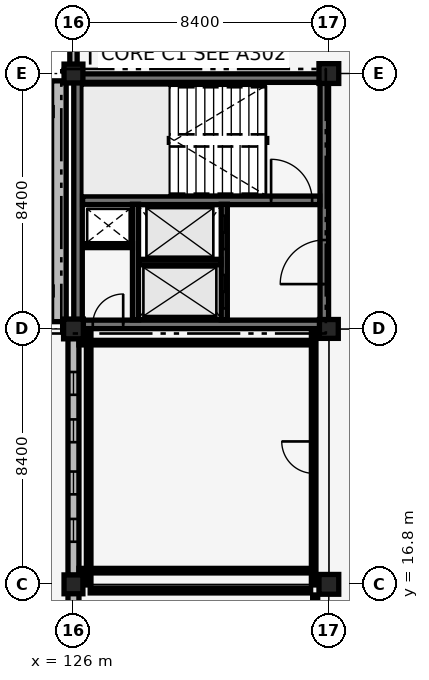
"""IFC4 building model, lengths in metres.
Left out: names, types, materials, properties, quantities, classifications, styles, units other than length and angle.
Written with IfcOpenShell. Run it as: python <this file> out.ifc"""

import sys

from ifc_helpers import new_model, si_unit, direction, frame, frame_2d, origin, origin_2d, place, context, subcontext, project, spatial, rectangle, extrude, element, fill, save


model = new_model("IFC4")
c1 = context("Model", 3, precision=1e-05, world=origin(), true_north=direction((0.0, 1.0)))
c2 = subcontext(c1, "Body", "Model", "MODEL_VIEW")
j1 = project(units=[si_unit("LENGTHUNIT", "METRE"), si_unit("PLANEANGLEUNIT", "RADIAN")], contexts=[c1])
p1 = place(None, origin())
s1 = spatial("IfcSite", under=j1, at=p1, CompositionType="ELEMENT")
p2 = place(p1, origin())
s2 = spatial("IfcBuilding", under=s1, at=p2, CompositionType="ELEMENT")
p3 = place(p2, frame((0.0, 0.0, 13.94)))
s3 = spatial("IfcBuildingStorey", under=s2, at=p3, CompositionType="ELEMENT", Elevation=13.94)
p4 = place(p3, frame((126.15, 25.35, 0.0), z_axis=(0.0, 0.0, 1.0), x_axis=(1.0, 0.0, 0.0)))
e1 = element("IfcWall", 1, at=p4, inside=s3, PredefinedType="SHEAR", context=c2, shape_type="SweptSolid", body=[
    extrude(rectangle(XDim=8.1, YDim=0.28, at=frame_2d((4.05, 0.0))), origin(), (0.0, 0.0, 1.0), 3.78),
])
p5 = place(p4, frame((0.485, 0.0, 0.0)))
e2 = element("IfcOpeningElement", 2, at=p5, cuts=e1, PredefinedType="OPENING", context=c2, shape_type="SweptSolid", body=[
    extrude(rectangle(XDim=1.0, YDim=2.15, at=frame_2d((0.5, 1.075))), frame((0.0, 0.15, 0.0), z_axis=(0.0, -1.0, 0.0), x_axis=(1.0, 0.0, 0.0)), (0.0, 0.0, 1.0), 0.3),
])
p6 = place(p3, frame((126.15, 33.45, 0.0), z_axis=(0.0, 0.0, 1.0), x_axis=(1.0, 0.0, 0.0)))
e3 = element("IfcWall", 3, at=p6, inside=s3, PredefinedType="SHEAR", context=c2, shape_type="SweptSolid", body=[
    extrude(rectangle(XDim=8.1, YDim=0.28, at=frame_2d((4.05, 0.0))), origin(), (0.0, 0.0, 1.0), 3.78),
])
p7 = place(p3, frame((126.15, 25.35, 0.0), z_axis=(0.0, 0.0, 1.0), x_axis=(0.0, 1.0, 0.0)))
e4 = element("IfcWall", 4, at=p7, inside=s3, PredefinedType="SHEAR", context=c2, shape_type="SweptSolid", body=[
    extrude(rectangle(XDim=8.1, YDim=0.28, at=frame_2d((4.05, 0.0))), origin(), (0.0, 0.0, 1.0), 3.78),
])
p8 = place(p3, frame((134.25, 25.35, 0.0), z_axis=(0.0, 0.0, 1.0), x_axis=(0.0, 1.0, 0.0)))
e5 = element("IfcWall", 5, at=p8, inside=s3, PredefinedType="SHEAR", context=c2, shape_type="SweptSolid", body=[
    extrude(rectangle(XDim=8.1, YDim=0.28, at=frame_2d((4.05, 0.0))), origin(), (0.0, 0.0, 1.0), 3.78),
])
p9 = place(p8, frame((1.325, 0.0, 0.0)))
e6 = element("IfcOpeningElement", 6, at=p9, cuts=e5, PredefinedType="OPENING", context=c2, shape_type="SweptSolid", body=[
    extrude(rectangle(XDim=1.45, YDim=2.15, at=frame_2d((0.725, 1.075))), frame((0.0, 0.15, 0.0), z_axis=(0.0, -1.0, 0.0), x_axis=(1.0, 0.0, 0.0)), (0.0, 0.0, 1.0), 0.3),
])
p10 = place(p3, frame((126.3, 29.43, 0.0), z_axis=(0.0, 0.0, 1.0), x_axis=(1.0, 0.0, 0.0)))
e7 = element("IfcWall", 7, at=p10, inside=s3, PredefinedType="SHEAR", context=c2, shape_type="SweptSolid", body=[
    extrude(rectangle(XDim=7.8, YDim=0.28, at=frame_2d((3.9, 0.0))), origin(), (0.0, 0.0, 1.0), 3.78),
])
p11 = place(p10, frame((6.2, 0.0, 0.0)))
e8 = element("IfcOpeningElement", 8, at=p11, cuts=e7, PredefinedType="OPENING", context=c2, shape_type="SweptSolid", body=[
    extrude(rectangle(XDim=1.35, YDim=2.15, at=frame_2d((0.675, 1.075))), frame((0.0, 0.15, 0.0), z_axis=(0.0, -1.0, 0.0), x_axis=(1.0, 0.0, 0.0)), (0.0, 0.0, 1.0), 0.3),
])
p12 = place(p3, frame((126.0, 16.8, 0.0), z_axis=(0.0, 0.0, 1.0), x_axis=(1.0, 0.0, 0.0)))
e9 = element("IfcColumn", 9, at=p12, inside=s3, PredefinedType="COLUMN", context=c2, shape_type="SweptSolid", body=[
    extrude(rectangle(XDim=0.62, YDim=0.62, at=origin_2d()), origin(), (0.0, 0.0, 1.0), 3.78),
])
p13 = place(p3, frame((126.0, 25.2, 0.0), z_axis=(0.0, 0.0, 1.0), x_axis=(1.0, 0.0, 0.0)))
e10 = element("IfcColumn", 10, at=p13, inside=s3, PredefinedType="COLUMN", context=c2, shape_type="SweptSolid", body=[
    extrude(rectangle(XDim=0.65, YDim=0.65, at=origin_2d()), origin(), (0.0, 0.0, 1.0), 3.78),
])
p14 = place(p3, frame((126.0, 33.6, 0.0), z_axis=(0.0, 0.0, 1.0), x_axis=(1.0, 0.0, 0.0)))
e11 = element("IfcColumn", 11, at=p14, inside=s3, PredefinedType="COLUMN", context=c2, shape_type="SweptSolid", body=[
    extrude(rectangle(XDim=0.62, YDim=0.62, at=origin_2d()), origin(), (0.0, 0.0, 1.0), 3.78),
])
p15 = place(p3, frame((134.4, 16.8, 0.0), z_axis=(0.0, 0.0, 1.0), x_axis=(1.0, 0.0, 0.0)))
e12 = element("IfcColumn", 12, at=p15, inside=s3, PredefinedType="COLUMN", context=c2, shape_type="SweptSolid", body=[
    extrude(rectangle(XDim=0.65, YDim=0.65, at=origin_2d()), origin(), (0.0, 0.0, 1.0), 3.78),
])
p16 = place(p3, frame((134.4, 25.2, 0.0), z_axis=(0.0, 0.0, 1.0), x_axis=(1.0, 0.0, 0.0)))
e13 = element("IfcColumn", 13, at=p16, inside=s3, PredefinedType="COLUMN", context=c2, shape_type="SweptSolid", body=[
    extrude(rectangle(XDim=0.62, YDim=0.62, at=origin_2d()), origin(), (0.0, 0.0, 1.0), 3.78),
])
p17 = place(p3, frame((134.4, 33.6, 0.0), z_axis=(0.0, 0.0, 1.0), x_axis=(1.0, 0.0, 0.0)))
e14 = element("IfcColumn", 14, at=p17, inside=s3, PredefinedType="COLUMN", context=c2, shape_type="SweptSolid", body=[
    extrude(rectangle(XDim=0.65, YDim=0.65, at=origin_2d()), origin(), (0.0, 0.0, 1.0), 3.78),
])
p18 = place(p3, frame((126.0, 8.625, 0.0), z_axis=(0.0, 0.0, 1.0), x_axis=(0.0, 1.0, 0.0)))
e15 = element("IfcWall", 15, at=p18, inside=s3, PredefinedType="SOLIDWALL", context=c2, shape_type="SweptSolid", body=[
    extrude(rectangle(XDim=7.88, YDim=0.36, at=frame_2d((3.94, 0.0))), origin(), (0.0, 0.0, 1.0), 3.78),
])
p19 = place(p18, frame((3.04, 0.0, 0.0)))
e16 = element("IfcOpeningElement", 16, at=p19, cuts=e15, PredefinedType="OPENING", context=c2, shape_type="SweptSolid", body=[
    extrude(rectangle(XDim=1.8, YDim=2.2, at=frame_2d((0.9, 1.1))), frame((0.0, 0.19, 0.0), z_axis=(0.0, -1.0, 0.0), x_axis=(1.0, 0.0, 0.0)), (0.0, 0.0, 1.0), 0.38),
])
p20 = place(p3, frame((126.0, 17.095, 0.0), z_axis=(0.0, 0.0, 1.0), x_axis=(0.0, 1.0, 0.0)))
e17 = element("IfcWall", 17, at=p20, inside=s3, PredefinedType="SOLIDWALL", context=c2, shape_type="SweptSolid", body=[
    extrude(rectangle(XDim=7.795, YDim=0.36, at=frame_2d((3.897, 0.0))), origin(), (0.0, 0.0, 1.0), 3.15),
])
p21 = place(p20, frame((1.106, 0.0, 0.7)))
e18 = element("IfcOpeningElement", 18, at=p21, cuts=e17, PredefinedType="OPENING", context=c2, shape_type="SweptSolid", body=[
    extrude(rectangle(XDim=0.75, YDim=2.1, at=frame_2d((0.375, 1.05))), frame((0.0, 0.19, 0.0), z_axis=(0.0, -1.0, 0.0), x_axis=(1.0, 0.0, 0.0)), (0.0, 0.0, 1.0), 0.38),
])
p22 = place(p20, frame((2.665, 0.0, 0.7)))
e19 = element("IfcOpeningElement", 19, at=p22, cuts=e17, PredefinedType="OPENING", context=c2, shape_type="SweptSolid", body=[
    extrude(rectangle(XDim=0.75, YDim=2.1, at=frame_2d((0.375, 1.05))), frame((0.0, 0.19, 0.0), z_axis=(0.0, -1.0, 0.0), x_axis=(1.0, 0.0, 0.0)), (0.0, 0.0, 1.0), 0.38),
])
p23 = place(p20, frame((4.38, 0.0, 0.7)))
e20 = element("IfcOpeningElement", 20, at=p23, cuts=e17, PredefinedType="OPENING", context=c2, shape_type="SweptSolid", body=[
    extrude(rectangle(XDim=0.75, YDim=2.1, at=frame_2d((0.375, 1.05))), frame((0.0, 0.19, 0.0), z_axis=(0.0, -1.0, 0.0), x_axis=(1.0, 0.0, 0.0)), (0.0, 0.0, 1.0), 0.38),
])
p24 = place(p20, frame((5.939, 0.0, 0.7)))
e21 = element("IfcOpeningElement", 21, at=p24, cuts=e17, PredefinedType="OPENING", context=c2, shape_type="SweptSolid", body=[
    extrude(rectangle(XDim=0.75, YDim=2.1, at=frame_2d((0.375, 1.05))), frame((0.0, 0.19, 0.0), z_axis=(0.0, -1.0, 0.0), x_axis=(1.0, 0.0, 0.0)), (0.0, 0.0, 1.0), 0.38),
])
p25 = place(p3, frame((125.52, 25.44, 0.0), z_axis=(0.0, 0.0, 1.0), x_axis=(0.0, 1.0, 0.0)))
e22 = element("IfcWall", 22, at=p25, inside=s3, PredefinedType="SOLIDWALL", context=c2, shape_type="SweptSolid", body=[
    extrude(rectangle(XDim=7.92, YDim=0.48, at=frame_2d((3.96, 0.0))), origin(), (0.0, 0.0, 1.0), 4.08),
])
p26 = place(p3, frame((126.0, 33.895, 0.0), z_axis=(0.0, 0.0, 1.0), x_axis=(0.0, 1.0, 0.0)))
e23 = element("IfcWall", 23, at=p26, inside=s3, PredefinedType="SOLIDWALL", context=c2, shape_type="SweptSolid", body=[
    extrude(rectangle(XDim=7.795, YDim=0.24, at=frame_2d((3.897, 0.0))), origin(), (0.0, 0.0, 1.0), 3.15),
])
p27 = place(p26, frame((0.8, 0.0, 0.35)))
e24 = element("IfcOpeningElement", 24, at=p27, cuts=e23, PredefinedType="OPENING", context=c2, shape_type="SweptSolid", body=[
    extrude(rectangle(XDim=0.44, YDim=1.25, at=frame_2d((0.22, 0.625))), frame((0.0, 0.13, 0.0), z_axis=(0.0, -1.0, 0.0), x_axis=(1.0, 0.0, 0.0)), (0.0, 0.0, 1.0), 0.26),
])
p28 = place(p26, frame((2.239, 0.0, 0.35)))
e25 = element("IfcOpeningElement", 25, at=p28, cuts=e23, PredefinedType="OPENING", context=c2, shape_type="SweptSolid", body=[
    extrude(rectangle(XDim=0.44, YDim=1.25, at=frame_2d((0.22, 0.625))), frame((0.0, 0.13, 0.0), z_axis=(0.0, -1.0, 0.0), x_axis=(1.0, 0.0, 0.0)), (0.0, 0.0, 1.0), 0.26),
])
p29 = place(p26, frame((3.677, 0.0, 0.35)))
e26 = element("IfcOpeningElement", 26, at=p29, cuts=e23, PredefinedType="OPENING", context=c2, shape_type="SweptSolid", body=[
    extrude(rectangle(XDim=0.44, YDim=1.25, at=frame_2d((0.22, 0.625))), frame((0.0, 0.13, 0.0), z_axis=(0.0, -1.0, 0.0), x_axis=(1.0, 0.0, 0.0)), (0.0, 0.0, 1.0), 0.26),
])
p30 = place(p26, frame((5.116, 0.0, 0.35)))
e27 = element("IfcOpeningElement", 27, at=p30, cuts=e23, PredefinedType="OPENING", context=c2, shape_type="SweptSolid", body=[
    extrude(rectangle(XDim=0.44, YDim=1.25, at=frame_2d((0.22, 0.625))), frame((0.0, 0.13, 0.0), z_axis=(0.0, -1.0, 0.0), x_axis=(1.0, 0.0, 0.0)), (0.0, 0.0, 1.0), 0.26),
])
p31 = place(p26, frame((6.555, 0.0, 0.35)))
e28 = element("IfcOpeningElement", 28, at=p31, cuts=e23, PredefinedType="OPENING", context=c2, shape_type="SweptSolid", body=[
    extrude(rectangle(XDim=0.44, YDim=1.25, at=frame_2d((0.22, 0.625))), frame((0.0, 0.13, 0.0), z_axis=(0.0, -1.0, 0.0), x_axis=(1.0, 0.0, 0.0)), (0.0, 0.0, 1.0), 0.26),
])
p32 = place(p3, frame((130.96, 25.5, 0.0), z_axis=(0.0, 0.0, 1.0), x_axis=(0.0, 1.0, 0.0)))
e29 = element("IfcWall", 29, at=p32, inside=s3, PredefinedType="SHEAR", context=c2, shape_type="SweptSolid", body=[
    extrude(rectangle(XDim=3.8, YDim=0.2, at=frame_2d((1.9, 0.0))), origin(), (0.0, 0.0, 1.0), 3.78),
])
p33 = place(p32, frame((0.375, 0.0, 0.0)))
e30 = element("IfcOpeningElement", 30, at=p33, cuts=e29, PredefinedType="OPENING", context=c2, shape_type="SweptSolid", body=[
    extrude(rectangle(XDim=1.1, YDim=2.15, at=frame_2d((0.55, 1.075))), frame((0.0, 0.11, 0.0), z_axis=(0.0, -1.0, 0.0), x_axis=(1.0, 0.0, 0.0)), (0.0, 0.0, 1.0), 0.22),
])
p34 = place(p32, frame((2.325, 0.0, 0.0)))
e31 = element("IfcOpeningElement", 31, at=p34, cuts=e29, PredefinedType="OPENING", context=c2, shape_type="SweptSolid", body=[
    extrude(rectangle(XDim=1.1, YDim=2.15, at=frame_2d((0.55, 1.075))), frame((0.0, 0.11, 0.0), z_axis=(0.0, -1.0, 0.0), x_axis=(1.0, 0.0, 0.0)), (0.0, 0.0, 1.0), 0.22),
])
p35 = place(p3, frame((128.04, 25.5, 0.0), z_axis=(0.0, 0.0, 1.0), x_axis=(0.0, 1.0, 0.0)))
e32 = element("IfcWall", 32, at=p35, inside=s3, PredefinedType="SHEAR", context=c2, shape_type="SweptSolid", body=[
    extrude(rectangle(XDim=3.8, YDim=0.2, at=frame_2d((1.9, 0.0))), origin(), (0.0, 0.0, 1.0), 3.78),
])
p36 = place(p3, frame((128.15, 27.4, 0.0), z_axis=(0.0, 0.0, 1.0), x_axis=(1.0, 0.0, 0.0)))
e33 = element("IfcWall", 33, at=p36, inside=s3, PredefinedType="SHEAR", context=c2, shape_type="SweptSolid", body=[
    extrude(rectangle(XDim=2.7, YDim=0.18, at=frame_2d((1.35, 0.0))), origin(), (0.0, 0.0, 1.0), 3.78),
])
p37 = place(p3, frame((126.32, 27.94, 0.0), z_axis=(0.0, 0.0, 1.0), x_axis=(1.0, 0.0, 0.0)))
e34 = element("IfcWall", 34, at=p37, inside=s3, PredefinedType="PARTITIONING", context=c2, shape_type="SweptSolid", body=[
    extrude(rectangle(XDim=1.62, YDim=0.13, at=frame_2d((0.81, 0.0))), origin(), (0.0, 0.0, 1.0), 3.78),
])
p38 = place(p3, frame((133.95, 0.18, 0.0), z_axis=(0.0, 0.0, 1.0), x_axis=(0.0, 1.0, 0.0)))
e35 = element("IfcWall", 35, at=p38, inside=s3, PredefinedType="PARTITIONING", context=c2, shape_type="SweptSolid", body=[
    extrude(rectangle(XDim=16.27, YDim=0.165, at=frame_2d((8.135, 0.0))), origin(), (0.0, 0.0, 1.0), 3.78),
])
p39 = place(p38, frame((4.401, 0.0, 0.0)))
e36 = element("IfcOpeningElement", 36, at=p39, cuts=e35, PredefinedType="OPENING", context=c2, shape_type="SweptSolid", body=[
    extrude(rectangle(XDim=1.6, YDim=2.25, at=frame_2d((0.8, 1.125))), frame((0.0, 0.093, 0.0), z_axis=(0.0, -1.0, 0.0), x_axis=(1.0, 0.0, 0.0)), (0.0, 0.0, 1.0), 0.185),
])
p40 = place(p3, frame((126.55, 16.6, 0.0), z_axis=(0.0, 0.0, 1.0), x_axis=(1.0, 0.0, 0.0)))
e37 = element("IfcWall", 37, at=p40, inside=s3, PredefinedType="PARTITIONING", context=c2, shape_type="SweptSolid", body=[
    extrude(rectangle(XDim=7.25, YDim=0.165, at=frame_2d((3.625, 0.0))), origin(), (0.0, 0.0, 1.0), 3.15),
])
p41 = place(p3, frame((126.18, 24.75, 0.0), z_axis=(0.0, 0.0, 1.0), x_axis=(1.0, 0.0, 0.0)))
e38 = element("IfcWall", 38, at=p41, inside=s3, PredefinedType="PARTITIONING", context=c2, shape_type="SweptSolid", body=[
    extrude(rectangle(XDim=7.57, YDim=0.15, at=frame_2d((3.785, 0.0))), origin(), (0.0, 0.0, 1.0), 3.15),
])
p42 = place(p3, frame((133.9, 16.78, 0.0), z_axis=(0.0, 0.0, 1.0), x_axis=(0.0, 1.0, 0.0)))
e39 = element("IfcWall", 39, at=p42, inside=s3, PredefinedType="PARTITIONING", context=c2, shape_type="SweptSolid", body=[
    extrude(rectangle(XDim=8.39, YDim=0.15, at=frame_2d((4.195, 0.0))), origin(), (0.0, 0.0, 1.0), 3.13),
])
p43 = place(p42, frame((3.67, 0.0, 0.0)))
e40 = element("IfcOpeningElement", 40, at=p43, cuts=e39, PredefinedType="OPENING", context=c2, shape_type="SweptSolid", body=[
    extrude(rectangle(XDim=1.05, YDim=2.15, at=frame_2d((0.525, 1.075))), frame((0.0, 0.085, 0.0), z_axis=(0.0, -1.0, 0.0), x_axis=(1.0, 0.0, 0.0)), (0.0, 0.0, 1.0), 0.17),
])
p44 = place(p3, frame((126.18, 17.25, 0.0), z_axis=(0.0, 0.0, 1.0), x_axis=(1.0, 0.0, 0.0)))
e41 = element("IfcWall", 41, at=p44, inside=s3, PredefinedType="PARTITIONING", context=c2, shape_type="SweptSolid", body=[
    extrude(rectangle(XDim=7.57, YDim=0.15, at=frame_2d((3.785, 0.0))), origin(), (0.0, 0.0, 1.0), 3.15),
])
p45 = place(p3, frame((126.5, 16.78, 0.0), z_axis=(0.0, 0.0, 1.0), x_axis=(0.0, 1.0, 0.0)))
e42 = element("IfcWall", 42, at=p45, inside=s3, PredefinedType="PARTITIONING", context=c2, shape_type="SweptSolid", body=[
    extrude(rectangle(XDim=8.39, YDim=0.15, at=frame_2d((4.195, 0.0))), origin(), (0.0, 0.0, 1.0), 3.13),
])
p46 = place(p21, origin())
e43 = element("IfcWindow", 43, at=p46, inside=s3, PartitioningType="DOUBLE_PANEL_VERTICAL", PredefinedType="WINDOW", context=c2, shape_type="SweptSolid", body=[
    extrude(rectangle(XDim=0.75, YDim=2.1, at=frame_2d((0.375, 1.05))), frame((0.0, 0.03, 0.0), z_axis=(0.0, -1.0, 0.0), x_axis=(1.0, 0.0, 0.0)), (0.0, 0.0, 1.0), 0.06),
])
fill(e18, e43)
p47 = place(p22, origin())
e44 = element("IfcWindow", 44, at=p47, inside=s3, PartitioningType="DOUBLE_PANEL_VERTICAL", PredefinedType="WINDOW", context=c2, shape_type="SweptSolid", body=[
    extrude(rectangle(XDim=0.75, YDim=2.1, at=frame_2d((0.375, 1.05))), frame((0.0, 0.03, 0.0), z_axis=(0.0, -1.0, 0.0), x_axis=(1.0, 0.0, 0.0)), (0.0, 0.0, 1.0), 0.06),
])
fill(e19, e44)
p48 = place(p23, origin())
e45 = element("IfcWindow", 45, at=p48, inside=s3, PartitioningType="DOUBLE_PANEL_VERTICAL", PredefinedType="WINDOW", context=c2, shape_type="SweptSolid", body=[
    extrude(rectangle(XDim=0.75, YDim=2.1, at=frame_2d((0.375, 1.05))), frame((0.0, 0.03, 0.0), z_axis=(0.0, -1.0, 0.0), x_axis=(1.0, 0.0, 0.0)), (0.0, 0.0, 1.0), 0.06),
])
fill(e20, e45)
p49 = place(p24, origin())
e46 = element("IfcWindow", 46, at=p49, inside=s3, PartitioningType="DOUBLE_PANEL_VERTICAL", PredefinedType="WINDOW", context=c2, shape_type="SweptSolid", body=[
    extrude(rectangle(XDim=0.75, YDim=2.1, at=frame_2d((0.375, 1.05))), frame((0.0, 0.03, 0.0), z_axis=(0.0, -1.0, 0.0), x_axis=(1.0, 0.0, 0.0)), (0.0, 0.0, 1.0), 0.06),
])
fill(e21, e46)
p50 = place(p11, origin())
e47 = element("IfcDoor", 47, at=p50, inside=s3, OperationType="SINGLE_SWING_LEFT", PredefinedType="DOOR", context=c2, shape_type="SweptSolid", body=[
    extrude(rectangle(XDim=1.35, YDim=2.15, at=frame_2d((0.675, 1.075))), frame((0.0, 0.025, 0.0), z_axis=(0.0, -1.0, 0.0), x_axis=(1.0, 0.0, 0.0)), (0.0, 0.0, 1.0), 0.05),
])
fill(e8, e47)
p51 = place(p33, origin())
e48 = element("IfcDoor", 48, at=p51, inside=s3, OperationType="SLIDING_TO_LEFT", PredefinedType="DOOR", context=c2, shape_type="SweptSolid", body=[
    extrude(rectangle(XDim=1.1, YDim=2.15, at=frame_2d((0.55, 1.075))), frame((0.0, 0.025, 0.0), z_axis=(0.0, -1.0, 0.0), x_axis=(1.0, 0.0, 0.0)), (0.0, 0.0, 1.0), 0.05),
])
fill(e30, e48)
p52 = place(p34, origin())
e49 = element("IfcDoor", 49, at=p52, inside=s3, OperationType="SLIDING_TO_LEFT", PredefinedType="DOOR", context=c2, shape_type="SweptSolid", body=[
    extrude(rectangle(XDim=1.1, YDim=2.15, at=frame_2d((0.55, 1.075))), frame((0.0, 0.025, 0.0), z_axis=(0.0, -1.0, 0.0), x_axis=(1.0, 0.0, 0.0)), (0.0, 0.0, 1.0), 0.05),
])
fill(e31, e49)
p53 = place(p9, origin())
e50 = element("IfcDoor", 50, at=p53, inside=s3, OperationType="DOUBLE_DOOR_SINGLE_SWING", PredefinedType="DOOR", context=c2, shape_type="SweptSolid", body=[
    extrude(rectangle(XDim=1.45, YDim=2.15, at=frame_2d((0.725, 1.075))), frame((0.0, 0.025, 0.0), z_axis=(0.0, -1.0, 0.0), x_axis=(1.0, 0.0, 0.0)), (0.0, 0.0, 1.0), 0.05),
])
fill(e6, e50)
p54 = place(p5, origin())
e51 = element("IfcDoor", 51, at=p54, inside=s3, OperationType="SINGLE_SWING_RIGHT", PredefinedType="DOOR", context=c2, shape_type="SweptSolid", body=[
    extrude(rectangle(XDim=1.0, YDim=2.15, at=frame_2d((0.5, 1.075))), frame((0.0, 0.025, 0.0), z_axis=(0.0, -1.0, 0.0), x_axis=(1.0, 0.0, 0.0)), (0.0, 0.0, 1.0), 0.05),
])
fill(e2, e51)
p55 = place(p43, origin())
e52 = element("IfcDoor", 52, at=p55, inside=s3, OperationType="SINGLE_SWING_RIGHT", PredefinedType="DOOR", context=c2, shape_type="SweptSolid", body=[
    extrude(rectangle(XDim=1.05, YDim=2.15, at=frame_2d((0.525, 1.075))), frame((0.0, 0.025, 0.0), z_axis=(0.0, -1.0, 0.0), x_axis=(1.0, 0.0, 0.0)), (0.0, 0.0, 1.0), 0.05),
])
fill(e40, e52)
save(model, sys.argv[1])
